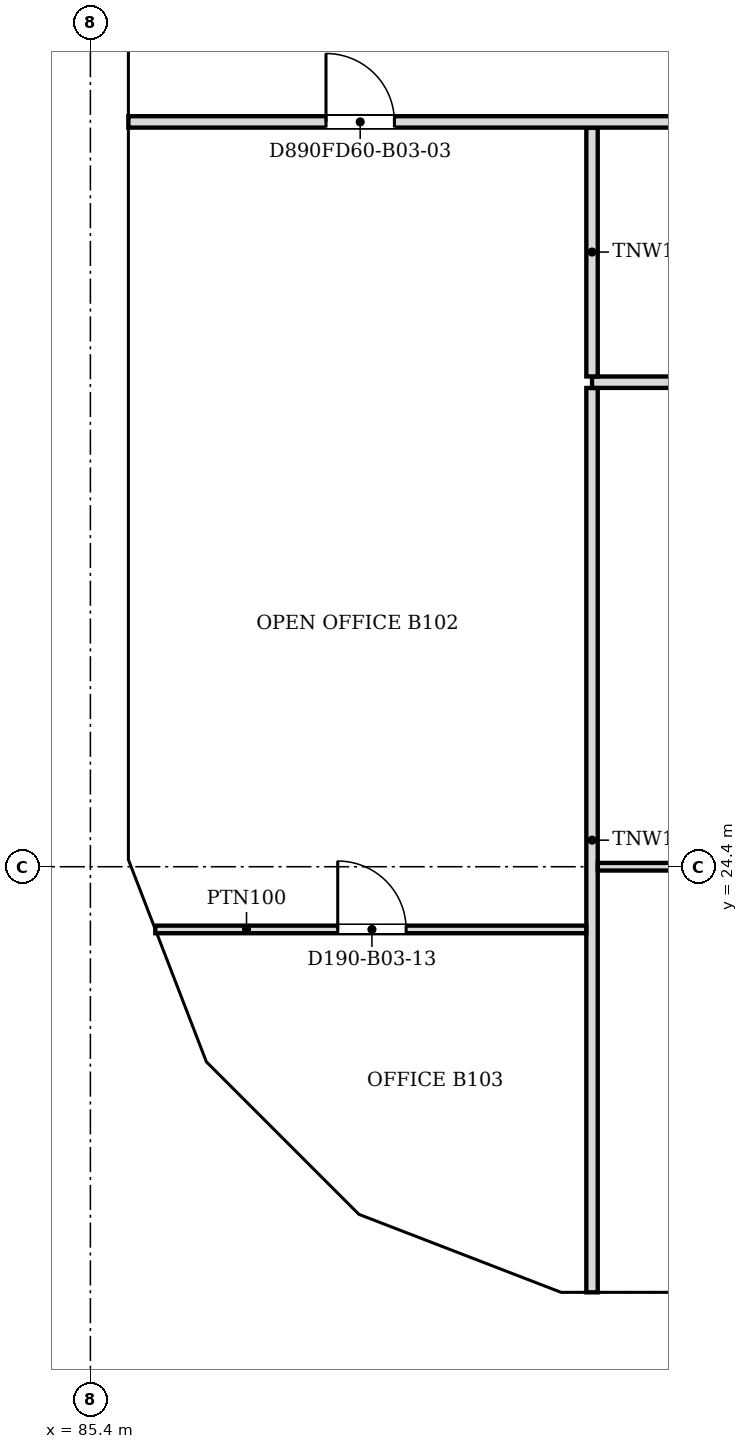
"""IFC4 building model, lengths in metres.
Left out: names, types, materials, properties, quantities, classifications, styles, units other than length and angle.
Written with IfcOpenShell. Run it as: python <this file> out.ifc"""

import sys

from ifc_helpers import new_model, si_unit, direction, frame, frame_2d, origin, place, context, subcontext, project, spatial, polyline, rectangle, outline, extrude, faceted_brep, source, transform, mapped, element, fill, save


model = new_model("IFC4")
c1 = context("Model", 3, precision=1e-05, world=origin(), true_north=direction((0.0, 1.0)))
c2 = subcontext(c1, "Body", "Model", "MODEL_VIEW")
j1 = project(units=[si_unit("LENGTHUNIT", "METRE"), si_unit("PLANEANGLEUNIT", "RADIAN")], contexts=[c1])
p1 = place(None, origin())
s1 = spatial("IfcSite", under=j1, at=p1, CompositionType="ELEMENT")
p2 = place(p1, origin())
s2 = spatial("IfcBuilding", under=s1, at=p2, CompositionType="ELEMENT")
p3 = place(p2, frame((0.0, 0.0, 33.4)))
s3 = spatial("IfcBuildingStorey", under=s2, at=p3, CompositionType="ELEMENT", Elevation=33.4)
m1 = source(origin(), c2, "Body", "Brep", [
    faceted_brep([(0.047, -0.25, 0.0), (3.05, -0.25, 3.8), (0.047, -0.25, 7.6), (0.0, -0.25, 7.54), (0.0, -0.25, 0.06), (0.093, 0.25, 7.541), (3.05, 0.25, 3.8), (0.093, 0.25, 0.059), (0.047, 0.0, 0.0), (0.047, 0.0, 7.6)], [[[0, 1, 2, 3, 4]], [[5, 6, 7]], [[7, 6, 1, 0, 8]], [[6, 5, 9, 2, 1]], [[3, 2, 9]], [[8, 0, 4]], [[7, 8, 4, 3, 9, 5]]]),
])
p4 = place(p3, frame((91.5, 18.55, -3.8), z_axis=(0.0, 0.0, 1.0), x_axis=(1.0, 0.0, 0.0)))
e1 = element("IfcWall", 1, at=p4, inside=s3, PredefinedType="SOLIDWALL", context=c2, shape_type="MappedRepresentation", body=[
    mapped(m1, transform((0.0, 0.0, 0.0), scale=1.0)),
])
m2 = source(origin(), c2, "Body", "SweptSolid", [
    extrude(outline(polyline([(0.247, 0.656), (2.731, 3.8), (0.247, 6.944), (0.247, 0.656)])), frame((0.0, 0.26, 0.0), z_axis=(0.0, -1.0, 0.0), x_axis=(1.0, 0.0, 0.0)), (0.0, 0.0, 1.0), 0.52),
])
p5 = place(p4, origin())
e2 = element("IfcOpeningElement", 2, at=p5, cuts=e1, PredefinedType="OPENING", context=c2, shape_type="MappedRepresentation", body=[
    mapped(m2, transform((0.0, 0.0, 0.0), scale=1.0)),
])
m3 = source(origin(), c2, "Body", "Brep", [
    faceted_brep([(2.95, -0.25, 0.0), (2.997, -0.25, 0.059), (2.997, -0.25, 7.541), (2.95, -0.25, 7.6), (0.0, -0.25, 3.8), (0.053, 0.25, 3.868), (2.904, 0.25, 7.54), (2.904, 0.25, 0.06), (0.053, 0.25, 3.732), (2.95, 0.0, 0.0), (2.95, 0.0, 7.6), (0.0, 0.0, 3.8)], [[[0, 1, 2, 3, 4]], [[5, 6, 7, 8]], [[1, 0, 9]], [[10, 3, 2]], [[6, 5, 11, 4, 3, 10]], [[8, 7, 9, 0, 4, 11]], [[8, 11, 5]], [[1, 9, 7, 6, 10, 2]]]),
])
p6 = place(p3, frame((88.794, 19.612, -3.8), z_axis=(0.0, 0.0, 1.0), x_axis=(0.933000876937, -0.359874094142, 0.0)))
e3 = element("IfcWall", 3, at=p6, inside=s3, PredefinedType="SOLIDWALL", context=c2, shape_type="MappedRepresentation", body=[
    mapped(m3, transform((0.0, 0.0, 0.0), scale=1.0)),
])
m4 = source(origin(), c2, "Body", "SweptSolid", [
    extrude(outline(polyline([(2.75, 6.935), (0.316, 3.8), (2.75, 0.665), (2.75, 6.935)])), frame((0.0, 0.26, 0.0), z_axis=(0.0, -1.0, 0.0), x_axis=(1.0, 0.0, 0.0)), (0.0, 0.0, 1.0), 0.52),
])
p7 = place(p6, origin())
e4 = element("IfcOpeningElement", 4, at=p7, cuts=e3, PredefinedType="OPENING", context=c2, shape_type="MappedRepresentation", body=[
    mapped(m4, transform((0.0, 0.0, 0.0), scale=1.0)),
])
m5 = source(origin(), c2, "Body", "SweptSolid", [
    extrude(outline(polyline([(3.05, 0.0), (6.1, 3.8), (3.05, 7.6), (0.0, 3.8), (3.05, 0.0)])), frame((0.0, 0.25, 0.0), z_axis=(0.0, -1.0, 0.0), x_axis=(1.0, 0.0, 0.0)), (0.0, 0.0, 1.0), 0.5),
])
p8 = place(p3, frame((85.65, 36.6, -3.8), z_axis=(0.0, 0.0, 1.0), x_axis=(0.0, -1.0, 0.0)))
e5 = element("IfcWall", 5, at=p8, inside=s3, PredefinedType="SOLIDWALL", context=c2, shape_type="MappedRepresentation", body=[
    mapped(m5, transform((0.0, 0.0, 0.0), scale=1.0)),
])
m6 = source(origin(), c2, "Body", "SweptSolid", [
    extrude(outline(polyline([(3.05, 0.399), (5.78, 3.8), (3.05, 7.2), (0.321, 3.8), (3.05, 0.399)])), frame((0.0, 0.26, 0.0), z_axis=(0.0, -1.0, 0.0), x_axis=(1.0, 0.0, 0.0)), (0.0, 0.0, 1.0), 0.52),
])
p9 = place(p8, origin())
e6 = element("IfcOpeningElement", 6, at=p9, cuts=e5, PredefinedType="OPENING", context=c2, shape_type="MappedRepresentation", body=[
    mapped(m6, transform((0.0, 0.0, 0.0), scale=1.0)),
])
m7 = source(origin(), c2, "Body", "Brep", [
    faceted_brep([(3.05, -0.25, 0.0), (6.053, -0.25, 3.8), (3.05, -0.25, 7.6), (0.0, -0.25, 3.8), (0.0, 0.25, 3.8), (3.05, 0.25, 7.6), (6.007, 0.25, 3.859), (6.007, 0.25, 3.741), (3.05, 0.25, 0.0), (6.053, 0.0, 3.8)], [[[0, 1, 2, 3]], [[4, 5, 6, 7, 8]], [[8, 7, 9, 1, 0]], [[6, 5, 2, 1, 9]], [[5, 4, 3, 2]], [[4, 8, 0, 3]], [[9, 7, 6]]]),
])
p10 = place(p3, frame((85.65, 30.5, -3.8), z_axis=(0.0, 0.0, 1.0), x_axis=(0.0, -1.0, 0.0)))
e7 = element("IfcWall", 7, at=p10, inside=s3, PredefinedType="SOLIDWALL", context=c2, shape_type="MappedRepresentation", body=[
    mapped(m7, transform((0.0, 0.0, 0.0), scale=1.0)),
])
m8 = source(origin(), c2, "Body", "SweptSolid", [
    extrude(outline(polyline([(3.049, 0.401), (5.735, 3.8), (3.049, 7.199), (0.321, 3.8), (3.049, 0.401)])), frame((0.0, 0.26, 0.0), z_axis=(0.0, -1.0, 0.0), x_axis=(1.0, 0.0, 0.0)), (0.0, 0.0, 1.0), 0.52),
])
p11 = place(p10, origin())
e8 = element("IfcOpeningElement", 8, at=p11, cuts=e7, PredefinedType="OPENING", context=c2, shape_type="MappedRepresentation", body=[
    mapped(m8, transform((0.0, 0.0, 0.0), scale=1.0)),
])
m9 = source(origin(), c2, "Body", "Brep", [
    faceted_brep([(2.95, -0.25, 0.0), (3.003, -0.25, 0.068), (3.003, -0.25, 7.531), (2.95, -0.25, 7.6), (0.0, -0.25, 3.8), (0.047, 0.25, 3.86), (2.898, 0.25, 7.532), (2.898, 0.25, 0.068), (0.047, 0.25, 3.74), (2.95, 0.0, 0.0), (2.95, 0.0, 7.6), (0.0, 0.0, 3.8)], [[[0, 1, 2, 3, 4]], [[5, 6, 7, 8]], [[1, 0, 9]], [[10, 3, 2]], [[6, 5, 11, 4, 3, 10]], [[8, 7, 9, 0, 4, 11]], [[8, 11, 5]], [[1, 9, 7, 6, 10, 2]]]),
])
p12 = place(p3, frame((85.65, 24.447, -3.8), z_axis=(0.0, 0.0, 1.0), x_axis=(0.35992665181, -0.932980602862, 0.0)))
e9 = element("IfcWall", 9, at=p12, inside=s3, PredefinedType="SOLIDWALL", context=c2, shape_type="MappedRepresentation", body=[
    mapped(m9, transform((0.0, 0.0, 0.0), scale=1.0)),
])
p13 = place(p12, origin())
e10 = element("IfcOpeningElement", 10, at=p13, cuts=e9, PredefinedType="OPENING", context=c2, shape_type="MappedRepresentation", body=[
    mapped(m4, transform((0.0, 0.0, 0.0), scale=1.0)),
])
m10 = source(origin(), c2, "Body", "Brep", [
    faceted_brep([(0.053, -0.25, 0.0), (2.997, -0.25, 3.8), (0.053, -0.25, 7.6), (0.0, -0.25, 7.532), (0.0, -0.25, 0.068), (0.106, 0.25, 7.531), (2.944, 0.25, 3.868), (2.944, 0.25, 3.732), (0.106, 0.25, 0.068), (2.997, 0.0, 3.8), (0.053, 0.0, 0.0), (0.053, 0.0, 7.6)], [[[0, 1, 2, 3, 4]], [[5, 6, 7, 8]], [[8, 7, 9, 1, 0, 10]], [[6, 5, 11, 2, 1, 9]], [[3, 2, 11]], [[10, 0, 4]], [[8, 10, 4, 3, 11, 5]], [[9, 7, 6]]]),
])
p14 = place(p3, frame((86.675, 21.731, -3.8), z_axis=(0.0, 0.0, 1.0), x_axis=(0.707106781187, -0.707106781187, 0.0)))
e11 = element("IfcWall", 11, at=p14, inside=s3, PredefinedType="SOLIDWALL", context=c2, shape_type="MappedRepresentation", body=[
    mapped(m10, transform((0.0, 0.0, 0.0), scale=1.0)),
])
m11 = source(origin(), c2, "Body", "SweptSolid", [
    extrude(outline(polyline([(0.253, 0.666), (2.681, 3.8), (0.253, 6.934), (0.253, 0.666)])), frame((0.0, 0.26, 0.0), z_axis=(0.0, -1.0, 0.0), x_axis=(1.0, 0.0, 0.0)), (0.0, 0.0, 1.0), 0.52),
])
p15 = place(p14, origin())
e12 = element("IfcOpeningElement", 12, at=p15, cuts=e11, PredefinedType="OPENING", context=c2, shape_type="MappedRepresentation", body=[
    mapped(m11, transform((0.0, 0.0, 0.0), scale=1.0)),
])
p16 = place(p2, frame((0.0, 0.0, 37.2)))
s4 = spatial("IfcBuildingStorey", under=s2, at=p16, CompositionType="ELEMENT", Elevation=37.2)
m12 = source(origin(), c2, "Body", "Brep", [
    faceted_brep([(3.003, -0.25, 0.0), (6.053, -0.25, 3.8), (3.003, -0.25, 7.6), (0.0, -0.25, 3.8), (0.047, 0.25, 3.859), (3.003, 0.25, 7.6), (6.053, 0.25, 3.8), (3.003, 0.25, 0.0), (0.047, 0.25, 3.741), (0.0, 0.0, 3.8)], [[[0, 1, 2, 3]], [[4, 5, 6, 7, 8]], [[7, 6, 1, 0]], [[6, 5, 2, 1]], [[5, 4, 9, 3, 2]], [[8, 7, 0, 3, 9]], [[8, 9, 4]]]),
])
p17 = place(p16, frame((91.547, 18.55, -3.8), z_axis=(0.0, 0.0, 1.0), x_axis=(1.0, 0.0, 0.0)))
e13 = element("IfcWall", 13, at=p17, inside=s4, PredefinedType="SOLIDWALL", context=c2, shape_type="MappedRepresentation", body=[
    mapped(m12, transform((0.0, 0.0, 0.0), scale=1.0)),
])
m13 = source(origin(), c2, "Body", "SweptSolid", [
    extrude(outline(polyline([(3.005, 0.401), (5.733, 3.8), (3.005, 7.199), (0.319, 3.8), (3.005, 0.401)])), frame((0.0, 0.26, 0.0), z_axis=(0.0, -1.0, 0.0), x_axis=(1.0, 0.0, 0.0)), (0.0, 0.0, 1.0), 0.52),
])
p18 = place(p17, origin())
e14 = element("IfcOpeningElement", 14, at=p18, cuts=e13, PredefinedType="OPENING", context=c2, shape_type="MappedRepresentation", body=[
    mapped(m13, transform((0.0, 0.0, 0.0), scale=1.0)),
])
m14 = source(origin(), c2, "Body", "Brep", [
    faceted_brep([(3.05, -0.25, 0.0), (6.1, -0.25, 3.8), (6.1, -0.25, 3.8), (3.05, -0.25, 7.6), (0.0, -0.25, 3.8), (0.0, 0.25, 3.8), (3.05, 0.25, 7.6), (6.1, 0.25, 3.8), (6.1, 0.25, 3.8), (3.05, 0.25, 0.0)], [[[0, 1, 2, 3, 4]], [[5, 6, 7, 8, 9]], [[9, 8, 1, 0]], [[7, 6, 3, 2]], [[6, 5, 4, 3]], [[5, 9, 0, 4]], [[1, 8, 7, 2]]]),
])
p19 = place(p16, frame((85.65, 39.65, -3.8), z_axis=(0.0, 0.0, 1.0), x_axis=(0.0, -1.0, 0.0)))
e15 = element("IfcWall", 15, at=p19, inside=s4, PredefinedType="SOLIDWALL", context=c2, shape_type="MappedRepresentation", body=[
    mapped(m14, transform((0.0, 0.0, 0.0), scale=1.0)),
])
m15 = source(origin(), c2, "Body", "SweptSolid", [
    extrude(outline(polyline([(3.05, 0.399), (5.78, 3.8), (3.05, 7.201), (0.321, 3.8), (3.05, 0.399)])), frame((0.0, 0.26, 0.0), z_axis=(0.0, -1.0, 0.0), x_axis=(1.0, 0.0, 0.0)), (0.0, 0.0, 1.0), 0.52),
])
p20 = place(p19, origin())
e16 = element("IfcOpeningElement", 16, at=p20, cuts=e15, PredefinedType="OPENING", context=c2, shape_type="MappedRepresentation", body=[
    mapped(m15, transform((0.0, 0.0, 0.0), scale=1.0)),
])
m16 = source(origin(), c2, "Body", "SweptSolid", [
    extrude(outline(polyline([(3.05, 0.0), (6.1, 3.8), (3.05, 7.6), (0.0, 3.8), (3.05, 0.0)])), frame((0.0, 0.25, 0.0), z_axis=(0.0, -1.0, 0.0), x_axis=(1.0, 0.0, 0.0)), (0.0, 0.0, 1.0), 0.5),
])
p21 = place(p16, frame((85.65, 33.55, -3.8), z_axis=(0.0, 0.0, 1.0), x_axis=(0.0, -1.0, 0.0)))
e17 = element("IfcWall", 17, at=p21, inside=s4, PredefinedType="SOLIDWALL", context=c2, shape_type="MappedRepresentation", body=[
    mapped(m16, transform((0.0, 0.0, 0.0), scale=1.0)),
])
p22 = place(p21, origin())
e18 = element("IfcOpeningElement", 18, at=p22, cuts=e17, PredefinedType="OPENING", context=c2, shape_type="MappedRepresentation", body=[
    mapped(m15, transform((0.0, 0.0, 0.0), scale=1.0)),
])
m17 = source(origin(), c2, "Body", "Brep", [
    faceted_brep([(3.003, -0.25, 0.0), (3.05, -0.25, 0.06), (3.05, -0.25, 7.54), (3.003, -0.25, 7.6), (0.0, -0.25, 3.8), (0.0, 0.25, 3.8), (2.957, 0.25, 7.541), (2.957, 0.25, 0.059), (3.003, 0.0, 0.0), (3.003, 0.0, 7.6)], [[[0, 1, 2, 3, 4]], [[5, 6, 7]], [[1, 0, 8]], [[9, 3, 2]], [[6, 5, 4, 3, 9]], [[5, 7, 8, 0, 4]], [[1, 8, 7, 6, 9, 2]]]),
])
p23 = place(p16, frame((85.65, 27.45, -3.8), z_axis=(0.0, 0.0, 1.0), x_axis=(0.0, -1.0, 0.0)))
e19 = element("IfcWall", 19, at=p23, inside=s4, PredefinedType="SOLIDWALL", context=c2, shape_type="MappedRepresentation", body=[
    mapped(m17, transform((0.0, 0.0, 0.0), scale=1.0)),
])
m18 = source(origin(), c2, "Body", "SweptSolid", [
    extrude(outline(polyline([(2.803, 6.944), (0.319, 3.8), (2.803, 0.656), (2.803, 6.944)])), frame((0.0, 0.26, 0.0), z_axis=(0.0, -1.0, 0.0), x_axis=(1.0, 0.0, 0.0)), (0.0, 0.0, 1.0), 0.52),
])
p24 = place(p23, origin())
e20 = element("IfcOpeningElement", 20, at=p24, cuts=e19, PredefinedType="OPENING", context=c2, shape_type="MappedRepresentation", body=[
    mapped(m18, transform((0.0, 0.0, 0.0), scale=1.0)),
])
m19 = source(origin(), c2, "Body", "Brep", [
    faceted_brep([(0.047, -0.25, 0.0), (2.997, -0.25, 3.8), (0.047, -0.25, 7.6), (0.0, -0.25, 7.541), (0.0, -0.25, 0.059), (0.093, 0.25, 7.54), (2.944, 0.25, 3.868), (2.944, 0.25, 3.732), (0.093, 0.25, 0.06), (2.997, 0.0, 3.8), (0.047, 0.0, 0.0), (0.047, 0.0, 7.6)], [[[0, 1, 2, 3, 4]], [[5, 6, 7, 8]], [[8, 7, 9, 1, 0, 10]], [[6, 5, 11, 2, 1, 9]], [[3, 2, 11]], [[10, 0, 4]], [[8, 10, 4, 3, 11, 5]], [[9, 7, 6]]]),
])
p25 = place(p16, frame((85.633, 24.49, -3.8), z_axis=(0.0, 0.0, 1.0), x_axis=(0.359901446078, -0.932990326376, 0.0)))
e21 = element("IfcWall", 21, at=p25, inside=s4, PredefinedType="SOLIDWALL", context=c2, shape_type="MappedRepresentation", body=[
    mapped(m19, transform((0.0, 0.0, 0.0), scale=1.0)),
])
m20 = source(origin(), c2, "Body", "SweptSolid", [
    extrude(outline(polyline([(0.247, 0.665), (2.681, 3.8), (0.247, 6.935), (0.247, 0.665)])), frame((0.0, 0.26, 0.0), z_axis=(0.0, -1.0, 0.0), x_axis=(1.0, 0.0, 0.0)), (0.0, 0.0, 1.0), 0.52),
])
p26 = place(p25, origin())
e22 = element("IfcOpeningElement", 22, at=p26, cuts=e21, PredefinedType="OPENING", context=c2, shape_type="MappedRepresentation", body=[
    mapped(m20, transform((0.0, 0.0, 0.0), scale=1.0)),
])
m21 = source(origin(), c2, "Body", "Brep", [
    faceted_brep([(2.944, -0.25, 0.0), (2.997, -0.25, 0.068), (2.997, -0.25, 7.532), (2.944, -0.25, 7.6), (0.0, -0.25, 3.8), (0.053, 0.25, 3.868), (2.891, 0.25, 7.532), (2.891, 0.25, 0.068), (0.053, 0.25, 3.732), (2.944, 0.0, 0.0), (2.944, 0.0, 7.6), (0.0, 0.0, 3.8)], [[[0, 1, 2, 3, 4]], [[5, 6, 7, 8]], [[1, 0, 9]], [[10, 3, 2]], [[6, 5, 11, 4, 3, 10]], [[8, 7, 9, 0, 4, 11]], [[8, 11, 5]], [[1, 9, 7, 6, 10, 2]]]),
])
p27 = place(p16, frame((86.712, 21.694, -3.8), z_axis=(0.0, 0.0, 1.0), x_axis=(0.707066050402, -0.707147509625, 0.0)))
e23 = element("IfcWall", 23, at=p27, inside=s4, PredefinedType="SOLIDWALL", context=c2, shape_type="MappedRepresentation", body=[
    mapped(m21, transform((0.0, 0.0, 0.0), scale=1.0)),
])
m22 = source(origin(), c2, "Body", "SweptSolid", [
    extrude(outline(polyline([(2.744, 6.934), (0.316, 3.8), (2.744, 0.667), (2.744, 6.934)])), frame((0.0, 0.26, 0.0), z_axis=(0.0, -1.0, 0.0), x_axis=(1.0, 0.0, 0.0)), (0.0, 0.0, 1.0), 0.52),
])
p28 = place(p27, origin())
e24 = element("IfcOpeningElement", 24, at=p28, cuts=e23, PredefinedType="OPENING", context=c2, shape_type="MappedRepresentation", body=[
    mapped(m22, transform((0.0, 0.0, 0.0), scale=1.0)),
])
m23 = source(origin(), c2, "Body", "Brep", [
    faceted_brep([(0.053, -0.25, 0.0), (3.003, -0.25, 3.8), (0.053, -0.25, 7.6), (0.0, -0.25, 7.532), (0.0, -0.25, 0.068), (0.106, 0.25, 7.532), (2.957, 0.25, 3.86), (2.957, 0.25, 3.74), (0.106, 0.25, 0.068), (3.003, 0.0, 3.8), (0.053, 0.0, 0.0), (0.053, 0.0, 7.6)], [[[0, 1, 2, 3, 4]], [[5, 6, 7, 8]], [[8, 7, 9, 1, 0, 10]], [[6, 5, 11, 2, 1, 9]], [[3, 2, 11]], [[10, 0, 4]], [[8, 10, 4, 3, 11, 5]], [[9, 7, 6]]]),
])
p29 = place(p16, frame((88.744, 19.631, -3.8), z_axis=(0.0, 0.0, 1.0), x_axis=(0.932997369089, -0.359883188373, 0.0)))
e25 = element("IfcWall", 25, at=p29, inside=s4, PredefinedType="SOLIDWALL", context=c2, shape_type="MappedRepresentation", body=[
    mapped(m23, transform((0.0, 0.0, 0.0), scale=1.0)),
])
m24 = source(origin(), c2, "Body", "SweptSolid", [
    extrude(outline(polyline([(0.253, 0.665), (2.687, 3.8), (0.253, 6.935), (0.253, 0.665)])), frame((0.0, 0.26, 0.0), z_axis=(0.0, -1.0, 0.0), x_axis=(1.0, 0.0, 0.0)), (0.0, 0.0, 1.0), 0.52),
])
p30 = place(p29, origin())
e26 = element("IfcOpeningElement", 26, at=p30, cuts=e25, PredefinedType="OPENING", context=c2, shape_type="MappedRepresentation", body=[
    mapped(m24, transform((0.0, 0.0, 0.0), scale=1.0)),
])
p31 = place(p3, frame((92.0, 18.8, 0.0), z_axis=(0.0, 0.0, 1.0), x_axis=(0.0, 1.0, 0.0)))
e27 = element("IfcWall", 27, at=p31, inside=s3, PredefinedType="PARTITIONING", context=c2, shape_type="SweptSolid", body=[
    extrude(rectangle(XDim=11.899, YDim=0.15, at=frame_2d((5.949, 0.0))), origin(), (0.0, 0.0, 1.0), 3.067),
])
p32 = place(p3, frame((91.924, 23.575, 0.0), z_axis=(0.0, 0.0, 1.0), x_axis=(-1.0, 0.0, 0.0)))
e28 = element("IfcWall", 28, at=p32, inside=s3, PredefinedType="PARTITIONING", context=c2, shape_type="SweptSolid", body=[
    extrude(rectangle(XDim=5.67, YDim=0.1, at=frame_2d((2.835, 0.0))), origin(), (0.0, 0.0, 1.0), 3.067),
])
m25 = source(origin(), c2, "Body", "SweptSolid", [
    extrude(rectangle(XDim=0.9, YDim=2.1, at=frame_2d((0.45, 1.05))), frame((0.0, 0.06, 0.0), z_axis=(0.0, -1.0, 0.0), x_axis=(1.0, 0.0, 0.0)), (0.0, 0.0, 1.0), 0.12),
])
p33 = place(p32, frame((2.37, 0.0, 0.0)))
e29 = element("IfcOpeningElement", 29, at=p33, cuts=e28, PredefinedType="OPENING", context=c2, shape_type="MappedRepresentation", body=[
    mapped(m25, transform((0.0, 0.0, 0.0), scale=1.0)),
])
p34 = place(p3, frame((97.149, 24.4, 0.0), z_axis=(0.0, 0.0, 1.0), x_axis=(-1.0, 0.0, 0.0)))
e30 = element("IfcWall", 30, at=p34, inside=s3, PredefinedType="PARTITIONING", context=c2, shape_type="SweptSolid", body=[
    extrude(rectangle(XDim=5.073, YDim=0.1, at=frame_2d((2.537, 0.0))), origin(), (0.0, 0.0, 1.0), 3.067),
])
p35 = place(p34, frame((2.073, 0.0, 0.0)))
e31 = element("IfcOpeningElement", 31, at=p35, cuts=e30, PredefinedType="OPENING", context=c2, shape_type="MappedRepresentation", body=[
    mapped(m25, transform((0.0, 0.0, 0.0), scale=1.0)),
])
p36 = place(p3, frame((104.2, 30.775, 0.0), z_axis=(0.0, 0.0, 1.0), x_axis=(-1.0, 0.0, 0.0)))
e32 = element("IfcWall", 32, at=p36, inside=s3, PredefinedType="PARTITIONING", context=c2, shape_type="SweptSolid", body=[
    extrude(rectangle(XDim=12.2, YDim=0.15, at=frame_2d((6.1, 0.0))), origin(), (0.0, 0.0, 1.0), 3.067),
])
m26 = source(origin(), c2, "Body", "SweptSolid", [
    extrude(rectangle(XDim=0.9, YDim=2.1, at=frame_2d((0.45, 1.05))), frame((0.0, 0.085, 0.0), z_axis=(0.0, -1.0, 0.0), x_axis=(1.0, 0.0, 0.0)), (0.0, 0.0, 1.0), 0.17),
])
p37 = place(p36, frame((5.7, 0.0, 0.0)))
e33 = element("IfcOpeningElement", 33, at=p37, cuts=e32, PredefinedType="OPENING", context=c2, shape_type="MappedRepresentation", body=[
    mapped(m26, transform((0.0, 0.0, 0.0), scale=1.0)),
])
p38 = place(p3, frame((92.0, 30.851, 0.0), z_axis=(0.0, 0.0, 1.0), x_axis=(0.0, 1.0, 0.0)))
e34 = element("IfcWall", 34, at=p38, inside=s3, PredefinedType="PARTITIONING", context=c2, shape_type="SweptSolid", body=[
    extrude(rectangle(XDim=3.273, YDim=0.15, at=frame_2d((1.636, 0.0))), origin(), (0.0, 0.0, 1.0), 3.067),
])
p39 = place(p3, frame((133.7, 34.2, 0.0), z_axis=(0.0, 0.0, 1.0), x_axis=(-1.0, 0.0, 0.0)))
e35 = element("IfcWall", 35, at=p39, inside=s3, PredefinedType="PARTITIONING", context=c2, shape_type="SweptSolid", body=[
    extrude(rectangle(XDim=47.8, YDim=0.15, at=frame_2d((23.9, 0.0))), origin(), (0.0, 0.0, 1.0), 3.067),
])
p40 = place(p39, frame((2.099, 0.0, 0.0)))
e36 = element("IfcOpeningElement", 36, at=p40, cuts=e35, PredefinedType="OPENING", context=c2, shape_type="MappedRepresentation", body=[
    mapped(m26, transform((0.0, 0.0, 0.0), scale=1.0)),
])
m27 = source(origin(), c2, "Body", "SweptSolid", [
    extrude(rectangle(XDim=1.0, YDim=2.1, at=frame_2d((0.5, 1.05))), frame((0.0, 0.085, 0.0), z_axis=(0.0, -1.0, 0.0), x_axis=(1.0, 0.0, 0.0)), (0.0, 0.0, 1.0), 0.17),
])
p41 = place(p39, frame((26.199, 0.0, 0.0)))
e37 = element("IfcOpeningElement", 37, at=p41, cuts=e35, PredefinedType="OPENING", context=c2, shape_type="MappedRepresentation", body=[
    mapped(m27, transform((0.0, 0.0, 0.0), scale=1.0)),
])
p42 = place(p39, frame((44.3, 0.0, 0.0)))
e38 = element("IfcOpeningElement", 38, at=p42, cuts=e35, PredefinedType="OPENING", context=c2, shape_type="MappedRepresentation", body=[
    mapped(m26, transform((0.0, 0.0, 0.0), scale=1.0)),
])
p43 = place(p39, frame((9.249, 0.0, 0.0)))
e39 = element("IfcOpeningElement", 39, at=p43, cuts=e35, PredefinedType="OPENING", context=c2, shape_type="MappedRepresentation", body=[
    mapped(m26, transform((0.0, 0.0, 0.0), scale=1.0)),
])
p44 = place(p39, frame((18.6, 0.0, 0.0)))
e40 = element("IfcOpeningElement", 40, at=p44, cuts=e35, PredefinedType="OPENING", context=c2, shape_type="MappedRepresentation", body=[
    mapped(m27, transform((0.0, 0.0, 0.0), scale=1.0)),
])
p45 = place(p39, frame((35.1, 0.0, 0.0)))
e41 = element("IfcOpeningElement", 41, at=p45, cuts=e35, PredefinedType="OPENING", context=c2, shape_type="MappedRepresentation", body=[
    mapped(m27, transform((0.0, 0.0, 0.0), scale=1.0)),
])
m28 = source(origin(), c2, "Body", "SweptSolid", [
    extrude(rectangle(XDim=0.9, YDim=2.1, at=frame_2d((0.45, 1.05))), frame((0.0, 0.025, 0.0), z_axis=(0.0, -1.0, 0.0), x_axis=(1.0, 0.0, 0.0)), (0.0, 0.0, 1.0), 0.05),
])
p46 = place(p33, origin())
e42 = element("IfcDoor", 42, at=p46, inside=s3, OperationType="SINGLE_SWING_RIGHT", PredefinedType="DOOR", context=c2, shape_type="MappedRepresentation", body=[
    mapped(m28, transform((0.0, 0.0, 0.0), scale=1.0)),
])
fill(e29, e42)
p47 = place(p42, origin())
e43 = element("IfcDoor", 43, at=p47, inside=s3, OperationType="SINGLE_SWING_RIGHT", PredefinedType="DOOR", context=c2, shape_type="MappedRepresentation", body=[
    mapped(m28, transform((0.0, 0.0, 0.0), scale=1.0)),
])
fill(e38, e43)
save(model, sys.argv[1])
